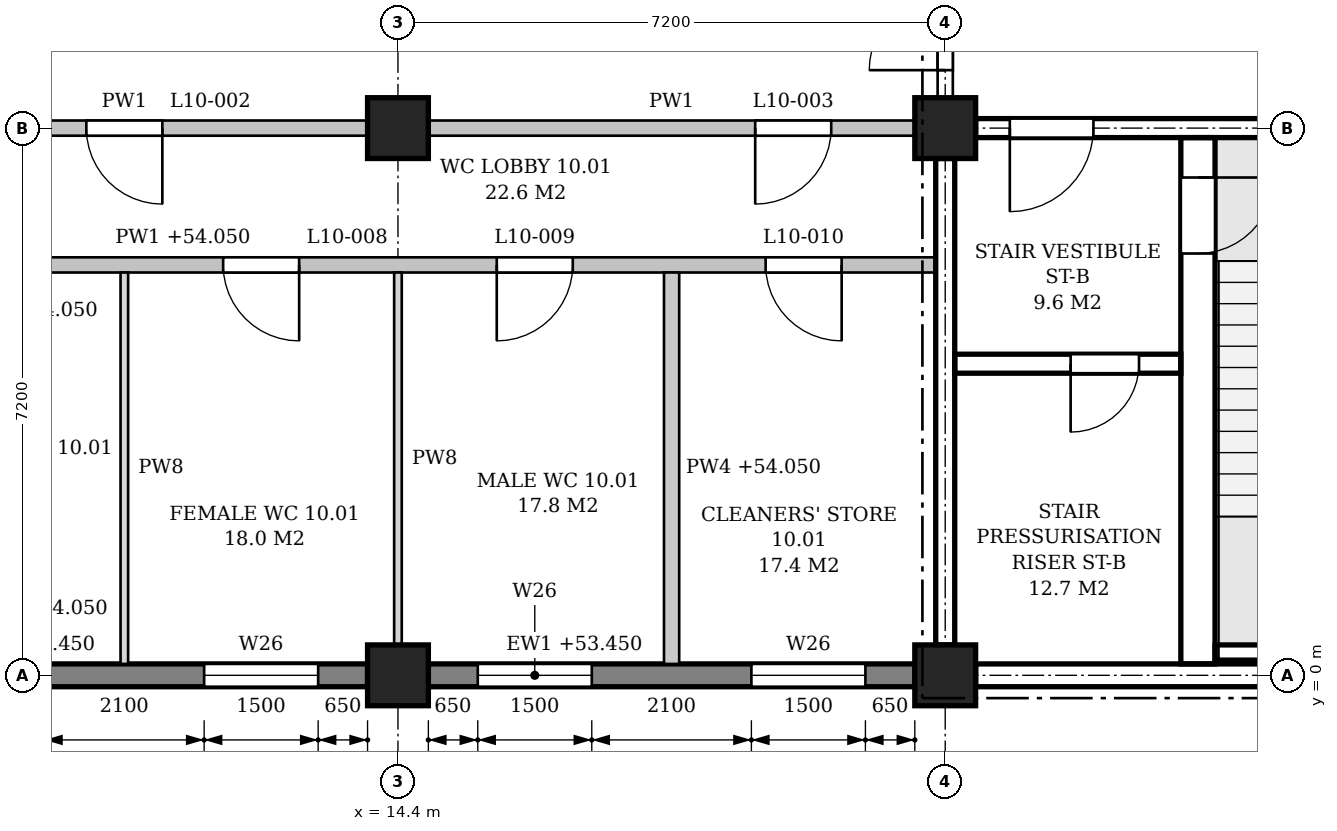
"""IFC4 building model, lengths in metres.
Left out: names, types, materials, properties, quantities, classifications, styles, units other than length and angle.
Written with IfcOpenShell. Run it as: python <this file> out.ifc"""

import sys

from ifc_helpers import new_model, si_unit, direction, frame, frame_2d, origin, origin_2d, place, context, subcontext, project, spatial, polyline, rectangle, outline, extrude, element, fill, save


model = new_model("IFC4")
c1 = context("Model", 3, precision=1e-05, world=origin(), true_north=direction((0.0, 1.0)))
c2 = subcontext(c1, "Body", "Model", "MODEL_VIEW")
j1 = project(units=[si_unit("LENGTHUNIT", "METRE"), si_unit("PLANEANGLEUNIT", "RADIAN")], contexts=[c1])
p1 = place(None, origin())
s1 = spatial("IfcSite", under=j1, at=p1, CompositionType="ELEMENT")
p2 = place(p1, origin())
s2 = spatial("IfcBuilding", under=s1, at=p2, CompositionType="ELEMENT")
p3 = place(p2, frame((0.0, 0.0, 49.8)))
s3 = spatial("IfcBuildingStorey", under=s2, at=p3, CompositionType="ELEMENT", Elevation=49.8)
for number, where, z_axis, x_axis in (
    (1, (14.4, 0.0, 0.0), (0.0, 0.0, 1.0), (1.0, 0.0, 0.0)),
    (2, (14.4, 7.2, 0.0), (0.0, 0.0, 1.0), (1.0, 0.0, 0.0)),
    (3, (21.6, 0.0, 0.0), (0.0, 0.0, 1.0), (1.0, 0.0, 0.0)),
    (4, (21.6, 7.2, 0.0), (0.0, 0.0, 1.0), (1.0, 0.0, 0.0)),
):
    element("IfcColumn", number, at=place(p3, frame(where, z_axis=z_axis, x_axis=x_axis)), inside=s3, PredefinedType="COLUMN", context=c2, shape_type="SweptSolid", body=[
        extrude(rectangle(XDim=0.8, YDim=0.8, at=origin_2d()), origin(), (0.0, 0.0, 1.0), 4.5),
    ])
p4 = place(p3, frame((7.6, 0.0, 0.0), z_axis=(0.0, 0.0, 1.0), x_axis=(1.0, 0.0, 0.0)))
e5 = element("IfcWall", 5, at=p4, inside=s3, PredefinedType="STANDARD", context=c2, shape_type="SweptSolid", body=[
    extrude(rectangle(XDim=6.4, YDim=0.3, at=frame_2d((3.2, 0.0))), origin(), (0.0, 0.0, 1.0), 3.65),
])
p5 = place(p4, frame((0.65, 0.0, 0.9)))
e6 = element("IfcOpeningElement", 6, at=p5, cuts=e5, PredefinedType="OPENING", context=c2, shape_type="SweptSolid", body=[
    extrude(outline(polyline([(0.0, 0.0), (1.5, 0.0), (1.5, 1.85), (0.75, 2.6), (0.0, 1.85), (0.0, 0.0)])), frame((0.0, 0.16, 0.0), z_axis=(0.0, -1.0, 0.0), x_axis=(1.0, 0.0, 0.0)), (0.0, 0.0, 1.0), 0.32),
])
p6 = place(p4, frame((4.25, 0.0, 0.9)))
e7 = element("IfcOpeningElement", 7, at=p6, cuts=e5, PredefinedType="OPENING", context=c2, shape_type="SweptSolid", body=[
    extrude(outline(polyline([(0.0, 0.0), (1.5, 0.0), (1.5, 1.85), (0.75, 2.6), (0.0, 1.85), (0.0, 0.0)])), frame((0.0, 0.16, 0.0), z_axis=(0.0, -1.0, 0.0), x_axis=(1.0, 0.0, 0.0)), (0.0, 0.0, 1.0), 0.32),
])
p7 = place(p3, frame((14.8, 0.0, 0.0), z_axis=(0.0, 0.0, 1.0), x_axis=(1.0, 0.0, 0.0)))
e8 = element("IfcWall", 8, at=p7, inside=s3, PredefinedType="STANDARD", context=c2, shape_type="SweptSolid", body=[
    extrude(rectangle(XDim=6.4, YDim=0.3, at=frame_2d((3.2, 0.0))), origin(), (0.0, 0.0, 1.0), 3.65),
])
p8 = place(p7, frame((0.65, 0.0, 0.9)))
e9 = element("IfcOpeningElement", 9, at=p8, cuts=e8, PredefinedType="OPENING", context=c2, shape_type="SweptSolid", body=[
    extrude(outline(polyline([(0.0, 0.0), (1.5, 0.0), (1.5, 1.85), (0.75, 2.6), (0.0, 1.85), (0.0, 0.0)])), frame((0.0, 0.16, 0.0), z_axis=(0.0, -1.0, 0.0), x_axis=(1.0, 0.0, 0.0)), (0.0, 0.0, 1.0), 0.32),
])
p9 = place(p7, frame((4.25, 0.0, 0.9)))
e10 = element("IfcOpeningElement", 10, at=p9, cuts=e8, PredefinedType="OPENING", context=c2, shape_type="SweptSolid", body=[
    extrude(outline(polyline([(0.0, 0.0), (1.5, 0.0), (1.5, 1.85), (0.75, 2.6), (0.0, 1.85), (0.0, 0.0)])), frame((0.0, 0.16, 0.0), z_axis=(0.0, -1.0, 0.0), x_axis=(1.0, 0.0, 0.0)), (0.0, 0.0, 1.0), 0.32),
])
p10 = place(p3, frame((22.0, 0.0, 0.0), z_axis=(0.0, 0.0, 1.0), x_axis=(1.0, 0.0, 0.0)))
e11 = element("IfcWall", 11, at=p10, inside=s3, PredefinedType="STANDARD", context=c2, shape_type="SweptSolid", body=[
    extrude(rectangle(XDim=6.4, YDim=0.3, at=frame_2d((3.2, 0.0))), origin(), (0.0, 0.0, 1.0), 3.65),
])
p11 = place(p10, frame((4.55, 0.0, 0.9)))
e12 = element("IfcOpeningElement", 12, at=p11, cuts=e11, PredefinedType="OPENING", context=c2, shape_type="SweptSolid", body=[
    extrude(outline(polyline([(0.0, 0.0), (0.9, 0.0), (0.9, 2.15), (0.45, 2.6), (0.0, 2.15), (0.0, 0.0)])), frame((0.0, 0.16, 0.0), z_axis=(0.0, -1.0, 0.0), x_axis=(1.0, 0.0, 0.0)), (0.0, 0.0, 1.0), 0.32),
])
p12 = place(p3, frame((22.0, 7.2, 0.0), z_axis=(0.0, 0.0, 1.0), x_axis=(1.0, 0.0, 0.0)))
e13 = element("IfcWall", 13, at=p12, inside=s3, PredefinedType="SHEAR", context=c2, shape_type="SweptSolid", body=[
    extrude(rectangle(XDim=6.4, YDim=0.25, at=frame_2d((3.2, 0.0))), origin(), (0.0, 0.0, 1.0), 3.55),
])
p13 = place(p12, frame((0.45, 0.0, 0.0)))
e14 = element("IfcOpeningElement", 14, at=p13, cuts=e13, PredefinedType="OPENING", context=c2, shape_type="SweptSolid", body=[
    extrude(rectangle(XDim=1.1, YDim=2.1, at=frame_2d((0.55, 1.05))), frame((0.0, 0.135, 0.0), z_axis=(0.0, -1.0, 0.0), x_axis=(1.0, 0.0, 0.0)), (0.0, 0.0, 1.0), 0.27),
])
p14 = place(p3, frame((21.6, 0.4, 0.0), z_axis=(0.0, 0.0, 1.0), x_axis=(0.0, 1.0, 0.0)))
e15 = element("IfcWall", 15, at=p14, inside=s3, PredefinedType="SHEAR", context=c2, shape_type="SweptSolid", body=[
    extrude(rectangle(XDim=6.4, YDim=0.25, at=frame_2d((3.2, 0.0))), origin(), (0.0, 0.0, 1.0), 3.55),
])
p15 = place(p3, frame((25.15, 0.3, -0.25), z_axis=(0.0, 0.0, 1.0), x_axis=(1.0, 0.0, 0.0)))
e16 = element("IfcWall", 16, at=p15, inside=s3, PredefinedType="SHEAR", context=c2, shape_type="SweptSolid", body=[
    extrude(rectangle(XDim=1.4, YDim=0.2, at=frame_2d((0.7, 0.0))), origin(), (0.0, 0.0, 1.0), 4.5),
])
p16 = place(p3, frame((24.925, 0.15, 0.0), z_axis=(0.0, 0.0, 1.0), x_axis=(0.0, 1.0, 0.0)))
e17 = element("IfcWall", 17, at=p16, inside=s3, PredefinedType="SHEAR", context=c2, shape_type="SweptSolid", body=[
    extrude(rectangle(XDim=6.925, YDim=0.45, at=frame_2d((3.462, 0.0))), origin(), (0.0, 0.0, 1.0), 4.25),
])
p17 = place(p16, frame((5.4, 0.0, 0.0)))
e18 = element("IfcOpeningElement", 18, at=p17, cuts=e17, PredefinedType="OPENING", context=c2, shape_type="SweptSolid", body=[
    extrude(rectangle(XDim=1.0, YDim=2.1, at=frame_2d((0.5, 1.05))), frame((0.0, 0.235, 0.0), z_axis=(0.0, -1.0, 0.0), x_axis=(1.0, 0.0, 0.0)), (0.0, 0.0, 1.0), 0.47),
])
p18 = place(p3, frame((21.725, 4.1, 0.0), z_axis=(0.0, 0.0, 1.0), x_axis=(1.0, 0.0, 0.0)))
e19 = element("IfcWall", 19, at=p18, inside=s3, PredefinedType="SHEAR", context=c2, shape_type="SweptSolid", body=[
    extrude(rectangle(XDim=2.975, YDim=0.25, at=frame_2d((1.487, 0.0))), origin(), (0.0, 0.0, 1.0), 4.25),
])
p19 = place(p18, frame((1.525, 0.0, 0.0)))
e20 = element("IfcOpeningElement", 20, at=p19, cuts=e19, PredefinedType="OPENING", context=c2, shape_type="SweptSolid", body=[
    extrude(rectangle(XDim=0.9, YDim=2.1, at=frame_2d((0.45, 1.05))), frame((0.0, 0.135, 0.0), z_axis=(0.0, -1.0, 0.0), x_axis=(1.0, 0.0, 0.0)), (0.0, 0.0, 1.0), 0.27),
])
p20 = place(p3, frame((7.325, 5.4, 0.0), z_axis=(0.0, 0.0, 1.0), x_axis=(1.0, 0.0, 0.0)))
e21 = element("IfcWall", 21, at=p20, inside=s3, PredefinedType="PARTITIONING", context=c2, shape_type="SweptSolid", body=[
    extrude(outline(polyline([(0.0, 0.0), (14.15, 0.0), (14.15, 3.55), (14.05, 3.55), (14.05, 4.25), (7.3, 4.25), (7.3, 3.55), (6.85, 3.55), (6.85, 4.25), (0.1, 4.25), (0.1, 3.55), (0.0, 3.55), (0.0, 0.0)])), frame((0.0, 0.1, 0.0), z_axis=(0.0, -1.0, 0.0), x_axis=(1.0, 0.0, 0.0)), (0.0, 0.0, 1.0), 0.2),
])
p21 = place(p20, frame((1.238, 0.0, 0.0)))
e22 = element("IfcOpeningElement", 22, at=p21, cuts=e21, PredefinedType="OPENING", context=c2, shape_type="SweptSolid", body=[
    extrude(rectangle(XDim=1.0, YDim=2.1, at=frame_2d((0.5, 1.05))), frame((0.0, 0.11, 0.0), z_axis=(0.0, -1.0, 0.0), x_axis=(1.0, 0.0, 0.0)), (0.0, 0.0, 1.0), 0.22),
])
p22 = place(p20, frame((4.775, 0.0, 0.0)))
e23 = element("IfcOpeningElement", 23, at=p22, cuts=e21, PredefinedType="OPENING", context=c2, shape_type="SweptSolid", body=[
    extrude(rectangle(XDim=1.0, YDim=2.1, at=frame_2d((0.5, 1.05))), frame((0.0, 0.11, 0.0), z_axis=(0.0, -1.0, 0.0), x_axis=(1.0, 0.0, 0.0)), (0.0, 0.0, 1.0), 0.22),
])
p23 = place(p20, frame((8.375, 0.0, 0.0)))
e24 = element("IfcOpeningElement", 24, at=p23, cuts=e21, PredefinedType="OPENING", context=c2, shape_type="SweptSolid", body=[
    extrude(rectangle(XDim=1.0, YDim=2.1, at=frame_2d((0.5, 1.05))), frame((0.0, 0.11, 0.0), z_axis=(0.0, -1.0, 0.0), x_axis=(1.0, 0.0, 0.0)), (0.0, 0.0, 1.0), 0.22),
])
p24 = place(p20, frame((11.913, 0.0, 0.0)))
e25 = element("IfcOpeningElement", 25, at=p24, cuts=e21, PredefinedType="OPENING", context=c2, shape_type="SweptSolid", body=[
    extrude(rectangle(XDim=1.0, YDim=2.1, at=frame_2d((0.5, 1.05))), frame((0.0, 0.11, 0.0), z_axis=(0.0, -1.0, 0.0), x_axis=(1.0, 0.0, 0.0)), (0.0, 0.0, 1.0), 0.22),
])
p25 = place(p3, frame((7.6, 7.2, 0.0), z_axis=(0.0, 0.0, 1.0), x_axis=(1.0, 0.0, 0.0)))
e26 = element("IfcWall", 26, at=p25, inside=s3, PredefinedType="PARTITIONING", context=c2, shape_type="SweptSolid", body=[
    extrude(rectangle(XDim=6.4, YDim=0.2, at=frame_2d((3.2, 0.0))), origin(), (0.0, 0.0, 1.0), 3.55),
])
p26 = place(p25, frame((2.7, 0.0, 0.0)))
e27 = element("IfcOpeningElement", 27, at=p26, cuts=e26, PredefinedType="OPENING", context=c2, shape_type="SweptSolid", body=[
    extrude(rectangle(XDim=1.0, YDim=2.1, at=frame_2d((0.5, 1.05))), frame((0.0, 0.11, 0.0), z_axis=(0.0, -1.0, 0.0), x_axis=(1.0, 0.0, 0.0)), (0.0, 0.0, 1.0), 0.22),
])
p27 = place(p3, frame((14.8, 7.2, 0.0), z_axis=(0.0, 0.0, 1.0), x_axis=(1.0, 0.0, 0.0)))
e28 = element("IfcWall", 28, at=p27, inside=s3, PredefinedType="PARTITIONING", context=c2, shape_type="SweptSolid", body=[
    extrude(rectangle(XDim=6.4, YDim=0.2, at=frame_2d((3.2, 0.0))), origin(), (0.0, 0.0, 1.0), 3.55),
])
p28 = place(p27, frame((4.3, 0.0, 0.0)))
e29 = element("IfcOpeningElement", 29, at=p28, cuts=e28, PredefinedType="OPENING", context=c2, shape_type="SweptSolid", body=[
    extrude(rectangle(XDim=1.0, YDim=2.1, at=frame_2d((0.5, 1.05))), frame((0.0, 0.11, 0.0), z_axis=(0.0, -1.0, 0.0), x_axis=(1.0, 0.0, 0.0)), (0.0, 0.0, 1.0), 0.22),
])
p29 = place(p3, frame((10.8, 0.15, 0.0), z_axis=(0.0, 0.0, 1.0), x_axis=(0.0, 1.0, 0.0)))
e30 = element("IfcWall", 30, at=p29, inside=s3, PredefinedType="PARTITIONING", context=c2, shape_type="SweptSolid", body=[
    extrude(rectangle(XDim=5.15, YDim=0.1, at=frame_2d((2.575, 0.0))), origin(), (0.0, 0.0, 1.0), 3.55),
])
p30 = place(p3, frame((14.4, 0.4, 0.0), z_axis=(0.0, 0.0, 1.0), x_axis=(0.0, 1.0, 0.0)))
e31 = element("IfcWall", 31, at=p30, inside=s3, PredefinedType="PARTITIONING", context=c2, shape_type="SweptSolid", body=[
    extrude(rectangle(XDim=4.9, YDim=0.1, at=frame_2d((2.45, 0.0))), origin(), (0.0, 0.0, 1.0), 3.55),
])
p31 = place(p3, frame((18.0, 0.15, 0.0), z_axis=(0.0, 0.0, 1.0), x_axis=(0.0, 1.0, 0.0)))
e32 = element("IfcWall", 32, at=p31, inside=s3, PredefinedType="PARTITIONING", context=c2, shape_type="SweptSolid", body=[
    extrude(outline(polyline([(0.0, 0.0), (5.15, 0.0), (5.15, 4.25), (0.05, 4.25), (0.05, 3.65), (0.0, 3.65), (0.0, 0.0)])), frame((0.0, 0.1, 0.0), z_axis=(0.0, -1.0, 0.0), x_axis=(1.0, 0.0, 0.0)), (0.0, 0.0, 1.0), 0.2),
])
p32 = place(p3, frame((21.6, 7.6, 0.0), z_axis=(0.0, 0.0, 1.0), x_axis=(0.0, 1.0, 0.0)))
e33 = element("IfcWall", 33, at=p32, inside=s3, PredefinedType="PARTITIONING", context=c2, shape_type="SweptSolid", body=[
    extrude(rectangle(XDim=2.725, YDim=0.2, at=frame_2d((1.362, 0.0))), origin(), (0.0, 0.0, 1.0), 3.55),
])
p33 = place(p32, frame((0.362, 0.0, 0.0)))
e34 = element("IfcOpeningElement", 34, at=p33, cuts=e33, PredefinedType="OPENING", context=c2, shape_type="SweptSolid", body=[
    extrude(rectangle(XDim=2.0, YDim=2.4, at=frame_2d((1.0, 1.2))), frame((0.0, 0.11, 0.0), z_axis=(0.0, -1.0, 0.0), x_axis=(1.0, 0.0, 0.0)), (0.0, 0.0, 1.0), 0.22),
])
p34 = place(p6, origin())
e35 = element("IfcWindow", 35, at=p34, inside=s3, PartitioningType="SINGLE_PANEL", PredefinedType="WINDOW", context=c2, shape_type="SweptSolid", body=[
    extrude(outline(polyline([(0.0, 0.0), (1.5, 0.0), (1.5, 1.85), (0.75, 2.6), (0.0, 1.85), (0.0, 0.0)])), frame((0.0, 0.03, 0.0), z_axis=(0.0, -1.0, 0.0), x_axis=(1.0, 0.0, 0.0)), (0.0, 0.0, 1.0), 0.06),
])
fill(e7, e35)
p35 = place(p8, origin())
e36 = element("IfcWindow", 36, at=p35, inside=s3, PartitioningType="SINGLE_PANEL", PredefinedType="WINDOW", context=c2, shape_type="SweptSolid", body=[
    extrude(outline(polyline([(0.0, 0.0), (1.5, 0.0), (1.5, 1.85), (0.75, 2.6), (0.0, 1.85), (0.0, 0.0)])), frame((0.0, 0.03, 0.0), z_axis=(0.0, -1.0, 0.0), x_axis=(1.0, 0.0, 0.0)), (0.0, 0.0, 1.0), 0.06),
])
fill(e9, e36)
p36 = place(p9, origin())
e37 = element("IfcWindow", 37, at=p36, inside=s3, PartitioningType="SINGLE_PANEL", PredefinedType="WINDOW", context=c2, shape_type="SweptSolid", body=[
    extrude(outline(polyline([(0.0, 0.0), (1.5, 0.0), (1.5, 1.85), (0.75, 2.6), (0.0, 1.85), (0.0, 0.0)])), frame((0.0, 0.03, 0.0), z_axis=(0.0, -1.0, 0.0), x_axis=(1.0, 0.0, 0.0)), (0.0, 0.0, 1.0), 0.06),
])
fill(e10, e37)
p37 = place(p17, frame((1.0, 0.0, 0.0), z_axis=(0.0, 0.0, 1.0), x_axis=(-1.0, 0.0, 0.0)))
e38 = element("IfcDoor", 38, at=p37, inside=s3, OperationType="SINGLE_SWING_LEFT", PredefinedType="DOOR", context=c2, shape_type="SweptSolid", body=[
    extrude(rectangle(XDim=1.0, YDim=2.1, at=frame_2d((0.5, 1.05))), frame((0.0, 0.025, 0.0), z_axis=(0.0, -1.0, 0.0), x_axis=(1.0, 0.0, 0.0)), (0.0, 0.0, 1.0), 0.05),
])
fill(e18, e38)
p38 = place(p13, frame((1.1, 0.0, 0.0), z_axis=(0.0, 0.0, 1.0), x_axis=(-1.0, 0.0, 0.0)))
e39 = element("IfcDoor", 39, at=p38, inside=s3, OperationType="SINGLE_SWING_RIGHT", PredefinedType="DOOR", context=c2, shape_type="SweptSolid", body=[
    extrude(rectangle(XDim=1.1, YDim=2.1, at=frame_2d((0.55, 1.05))), frame((0.0, 0.025, 0.0), z_axis=(0.0, -1.0, 0.0), x_axis=(1.0, 0.0, 0.0)), (0.0, 0.0, 1.0), 0.05),
])
fill(e14, e39)
p39 = place(p19, frame((0.9, 0.0, 0.0), z_axis=(0.0, 0.0, 1.0), x_axis=(-1.0, 0.0, 0.0)))
e40 = element("IfcDoor", 40, at=p39, inside=s3, OperationType="SINGLE_SWING_RIGHT", PredefinedType="DOOR", context=c2, shape_type="SweptSolid", body=[
    extrude(rectangle(XDim=0.9, YDim=2.1, at=frame_2d((0.45, 1.05))), frame((0.0, 0.025, 0.0), z_axis=(0.0, -1.0, 0.0), x_axis=(1.0, 0.0, 0.0)), (0.0, 0.0, 1.0), 0.05),
])
fill(e20, e40)
p40 = place(p33, origin())
e41 = element("IfcDoor", 41, at=p40, inside=s3, OperationType="DOUBLE_DOOR_SINGLE_SWING", PredefinedType="DOOR", context=c2, shape_type="SweptSolid", body=[
    extrude(rectangle(XDim=2.0, YDim=2.4, at=frame_2d((1.0, 1.2))), frame((0.0, 0.025, 0.0), z_axis=(0.0, -1.0, 0.0), x_axis=(1.0, 0.0, 0.0)), (0.0, 0.0, 1.0), 0.05),
])
fill(e34, e41)
p41 = place(p26, frame((1.0, 0.0, 0.0), z_axis=(0.0, 0.0, 1.0), x_axis=(-1.0, 0.0, 0.0)))
e42 = element("IfcDoor", 42, at=p41, inside=s3, OperationType="SINGLE_SWING_LEFT", PredefinedType="DOOR", context=c2, shape_type="SweptSolid", body=[
    extrude(rectangle(XDim=1.0, YDim=2.1, at=frame_2d((0.5, 1.05))), frame((0.0, 0.025, 0.0), z_axis=(0.0, -1.0, 0.0), x_axis=(1.0, 0.0, 0.0)), (0.0, 0.0, 1.0), 0.05),
])
fill(e27, e42)
p42 = place(p28, frame((1.0, 0.0, 0.0), z_axis=(0.0, 0.0, 1.0), x_axis=(-1.0, 0.0, 0.0)))
e43 = element("IfcDoor", 43, at=p42, inside=s3, OperationType="SINGLE_SWING_RIGHT", PredefinedType="DOOR", context=c2, shape_type="SweptSolid", body=[
    extrude(rectangle(XDim=1.0, YDim=2.1, at=frame_2d((0.5, 1.05))), frame((0.0, 0.025, 0.0), z_axis=(0.0, -1.0, 0.0), x_axis=(1.0, 0.0, 0.0)), (0.0, 0.0, 1.0), 0.05),
])
fill(e29, e43)
p43 = place(p22, frame((1.0, 0.0, 0.0), z_axis=(0.0, 0.0, 1.0), x_axis=(-1.0, 0.0, 0.0)))
e44 = element("IfcDoor", 44, at=p43, inside=s3, OperationType="SINGLE_SWING_LEFT", PredefinedType="DOOR", context=c2, shape_type="SweptSolid", body=[
    extrude(rectangle(XDim=1.0, YDim=2.1, at=frame_2d((0.5, 1.05))), frame((0.0, 0.025, 0.0), z_axis=(0.0, -1.0, 0.0), x_axis=(1.0, 0.0, 0.0)), (0.0, 0.0, 1.0), 0.05),
])
fill(e23, e44)
p44 = place(p23, frame((1.0, 0.0, 0.0), z_axis=(0.0, 0.0, 1.0), x_axis=(-1.0, 0.0, 0.0)))
e45 = element("IfcDoor", 45, at=p44, inside=s3, OperationType="SINGLE_SWING_RIGHT", PredefinedType="DOOR", context=c2, shape_type="SweptSolid", body=[
    extrude(rectangle(XDim=1.0, YDim=2.1, at=frame_2d((0.5, 1.05))), frame((0.0, 0.025, 0.0), z_axis=(0.0, -1.0, 0.0), x_axis=(1.0, 0.0, 0.0)), (0.0, 0.0, 1.0), 0.05),
])
fill(e24, e45)
p45 = place(p24, frame((1.0, 0.0, 0.0), z_axis=(0.0, 0.0, 1.0), x_axis=(-1.0, 0.0, 0.0)))
e46 = element("IfcDoor", 46, at=p45, inside=s3, OperationType="SINGLE_SWING_LEFT", PredefinedType="DOOR", context=c2, shape_type="SweptSolid", body=[
    extrude(rectangle(XDim=1.0, YDim=2.1, at=frame_2d((0.5, 1.05))), frame((0.0, 0.025, 0.0), z_axis=(0.0, -1.0, 0.0), x_axis=(1.0, 0.0, 0.0)), (0.0, 0.0, 1.0), 0.05),
])
fill(e25, e46)
save(model, sys.argv[1])
